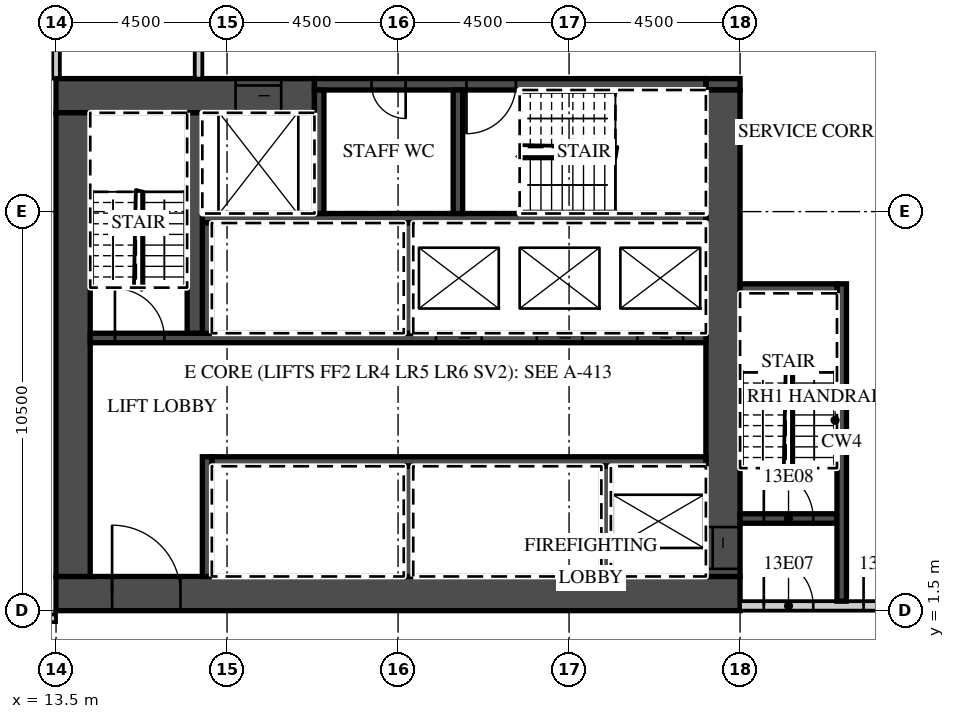
"""IFC4 building model, lengths in metres.
Left out: names, types, materials, properties, quantities, classifications, styles, units other than length and angle.
Written with IfcOpenShell. Run it as: python <this file> out.ifc"""

import sys

from ifc_helpers import new_model, si_unit, direction, frame, frame_2d, origin, place, context, subcontext, project, spatial, rectangle, extrude, element, fill, save


model = new_model("IFC4")
c1 = context("Model", 3, precision=1e-05, world=origin(), true_north=direction((0.0, 1.0)))
c2 = subcontext(c1, "Body", "Model", "MODEL_VIEW")
j1 = project(units=[si_unit("LENGTHUNIT", "METRE"), si_unit("PLANEANGLEUNIT", "RADIAN")], contexts=[c1])
p1 = place(None, origin())
s1 = spatial("IfcSite", under=j1, at=p1, CompositionType="ELEMENT")
p2 = place(p1, origin())
s2 = spatial("IfcBuilding", under=s1, at=p2, CompositionType="ELEMENT")
p3 = place(p2, frame((0.0, 0.0, 73.2)))
s3 = spatial("IfcBuildingStorey", under=s2, at=p3, CompositionType="ELEMENT", Elevation=73.2)
p4 = place(p3, frame((13.5, 15.5, 0.0), z_axis=(0.0, 0.0, 1.0), x_axis=(0.0, 1.0, 0.0)))
e1 = element("IfcWall", 1, at=p4, inside=s3, PredefinedType="PARTITIONING", context=c2, shape_type="SweptSolid", body=[
    extrude(rectangle(XDim=6.05, YDim=0.2, at=frame_2d((3.025, 0.0))), origin(), (0.0, 0.0, 1.0), 3.02),
])
p5 = place(p3, frame((-44.55, 1.3, 0.0), z_axis=(0.0, 0.0, 1.0), x_axis=(1.0, 0.0, 0.0)))
e2 = element("IfcWall", 2, at=p5, inside=s3, PredefinedType="PARTITIONING", context=c2, shape_type="SweptSolid", body=[
    extrude(rectangle(XDim=58.05, YDim=0.2, at=frame_2d((29.025, 0.0))), origin(), (0.0, 0.0, 1.0), 3.02),
])
p6 = place(p5, frame((0.525, 0.0, 0.0)))
e3 = element("IfcOpeningElement", 3, at=p6, cuts=e2, PredefinedType="OPENING", context=c2, shape_type="SweptSolid", body=[
    extrude(rectangle(XDim=1.0, YDim=2.1, at=frame_2d((0.5, 1.05))), frame((0.0, 0.11, 0.0), z_axis=(0.0, -1.0, 0.0), x_axis=(1.0, 0.0, 0.0)), (0.0, 0.0, 1.0), 0.22),
])
p7 = place(p5, frame((6.975, 0.0, 0.0)))
e4 = element("IfcOpeningElement", 4, at=p7, cuts=e2, PredefinedType="OPENING", context=c2, shape_type="SweptSolid", body=[
    extrude(rectangle(XDim=1.0, YDim=2.1, at=frame_2d((0.5, 1.05))), frame((0.0, 0.11, 0.0), z_axis=(0.0, -1.0, 0.0), x_axis=(1.0, 0.0, 0.0)), (0.0, 0.0, 1.0), 0.22),
])
p8 = place(p5, frame((9.125, 0.0, 0.0)))
e5 = element("IfcOpeningElement", 5, at=p8, cuts=e2, PredefinedType="OPENING", context=c2, shape_type="SweptSolid", body=[
    extrude(rectangle(XDim=1.0, YDim=2.1, at=frame_2d((0.5, 1.05))), frame((0.0, 0.11, 0.0), z_axis=(0.0, -1.0, 0.0), x_axis=(1.0, 0.0, 0.0)), (0.0, 0.0, 1.0), 0.22),
])
p9 = place(p5, frame((13.6, 0.0, 0.0)))
e6 = element("IfcOpeningElement", 6, at=p9, cuts=e2, PredefinedType="OPENING", context=c2, shape_type="SweptSolid", body=[
    extrude(rectangle(XDim=1.0, YDim=2.1, at=frame_2d((0.5, 1.05))), frame((0.0, 0.11, 0.0), z_axis=(0.0, -1.0, 0.0), x_axis=(1.0, 0.0, 0.0)), (0.0, 0.0, 1.0), 0.22),
])
p10 = place(p5, frame((19.987, 0.0, 0.0)))
e7 = element("IfcOpeningElement", 7, at=p10, cuts=e2, PredefinedType="OPENING", context=c2, shape_type="SweptSolid", body=[
    extrude(rectangle(XDim=1.2, YDim=2.1, at=frame_2d((0.6, 1.05))), frame((0.0, 0.11, 0.0), z_axis=(0.0, -1.0, 0.0), x_axis=(1.0, 0.0, 0.0)), (0.0, 0.0, 1.0), 0.22),
])
p11 = place(p5, frame((31.912, 0.0, 0.0)))
e8 = element("IfcOpeningElement", 8, at=p11, cuts=e2, PredefinedType="OPENING", context=c2, shape_type="SweptSolid", body=[
    extrude(rectangle(XDim=1.2, YDim=2.1, at=frame_2d((0.6, 1.05))), frame((0.0, 0.11, 0.0), z_axis=(0.0, -1.0, 0.0), x_axis=(1.0, 0.0, 0.0)), (0.0, 0.0, 1.0), 0.22),
])
p12 = place(p5, frame((38.5, 0.0, 0.0)))
e9 = element("IfcOpeningElement", 9, at=p12, cuts=e2, PredefinedType="OPENING", context=c2, shape_type="SweptSolid", body=[
    extrude(rectangle(XDim=1.0, YDim=2.1, at=frame_2d((0.5, 1.05))), frame((0.0, 0.11, 0.0), z_axis=(0.0, -1.0, 0.0), x_axis=(1.0, 0.0, 0.0)), (0.0, 0.0, 1.0), 0.22),
])
p13 = place(p5, frame((40.6, 0.0, 0.0)))
e10 = element("IfcOpeningElement", 10, at=p13, cuts=e2, PredefinedType="OPENING", context=c2, shape_type="SweptSolid", body=[
    extrude(rectangle(XDim=1.0, YDim=2.1, at=frame_2d((0.5, 1.05))), frame((0.0, 0.11, 0.0), z_axis=(0.0, -1.0, 0.0), x_axis=(1.0, 0.0, 0.0)), (0.0, 0.0, 1.0), 0.22),
])
p14 = place(p5, frame((47.5, 0.0, 0.0)))
e11 = element("IfcOpeningElement", 11, at=p14, cuts=e2, PredefinedType="OPENING", context=c2, shape_type="SweptSolid", body=[
    extrude(rectangle(XDim=1.0, YDim=2.1, at=frame_2d((0.5, 1.05))), frame((0.0, 0.11, 0.0), z_axis=(0.0, -1.0, 0.0), x_axis=(1.0, 0.0, 0.0)), (0.0, 0.0, 1.0), 0.22),
])
p15 = place(p5, frame((51.975, 0.0, 0.0)))
e12 = element("IfcOpeningElement", 12, at=p15, cuts=e2, PredefinedType="OPENING", context=c2, shape_type="SweptSolid", body=[
    extrude(rectangle(XDim=1.0, YDim=2.1, at=frame_2d((0.5, 1.05))), frame((0.0, 0.11, 0.0), z_axis=(0.0, -1.0, 0.0), x_axis=(1.0, 0.0, 0.0)), (0.0, 0.0, 1.0), 0.22),
])
p16 = place(p5, frame((56.475, 0.0, 0.0)))
e13 = element("IfcOpeningElement", 13, at=p16, cuts=e2, PredefinedType="OPENING", context=c2, shape_type="SweptSolid", body=[
    extrude(rectangle(XDim=1.0, YDim=2.1, at=frame_2d((0.5, 1.05))), frame((0.0, 0.11, 0.0), z_axis=(0.0, -1.0, 0.0), x_axis=(1.0, 0.0, 0.0)), (0.0, 0.0, 1.0), 0.22),
])
p17 = place(p3, frame((13.5, 1.95, 0.0), z_axis=(0.0, 0.0, 1.0), x_axis=(1.0, 0.0, 0.0)))
e14 = element("IfcWall", 14, at=p17, inside=s3, PredefinedType="SHEAR", context=c2, shape_type="SweptSolid", body=[
    extrude(rectangle(XDim=18.0, YDim=0.9, at=frame_2d((9.0, 0.0))), origin(), (0.0, 0.0, 1.0), 3.02),
])
p18 = place(p17, frame((1.475, 0.0, 0.0)))
e15 = element("IfcOpeningElement", 15, at=p18, cuts=e14, PredefinedType="OPENING", context=c2, shape_type="SweptSolid", body=[
    extrude(rectangle(XDim=1.8, YDim=2.1, at=frame_2d((0.9, 1.05))), frame((0.0, 0.46, 0.0), z_axis=(0.0, -1.0, 0.0), x_axis=(1.0, 0.0, 0.0)), (0.0, 0.0, 1.0), 0.92),
])
p19 = place(p3, frame((13.5, 15.05, 0.0), z_axis=(0.0, 0.0, 1.0), x_axis=(1.0, 0.0, 0.0)))
e16 = element("IfcWall", 16, at=p19, inside=s3, PredefinedType="SHEAR", context=c2, shape_type="SweptSolid", body=[
    extrude(rectangle(XDim=6.8, YDim=0.9, at=frame_2d((3.4, 0.0))), origin(), (0.0, 0.0, 1.0), 3.02),
])
p20 = place(p19, frame((4.725, 0.0, 0.0)))
e17 = element("IfcOpeningElement", 17, at=p20, cuts=e16, PredefinedType="OPENING", context=c2, shape_type="SweptSolid", body=[
    extrude(rectangle(XDim=1.2, YDim=2.1, at=frame_2d((0.6, 1.05))), frame((0.0, 0.46, 0.0), z_axis=(0.0, -1.0, 0.0), x_axis=(1.0, 0.0, 0.0)), (0.0, 0.0, 1.0), 0.92),
])
p21 = place(p3, frame((30.6, 15.35, 0.0), z_axis=(0.0, 0.0, 1.0), x_axis=(1.0, 0.0, 0.0)))
e18 = element("IfcWall", 18, at=p21, inside=s3, PredefinedType="SHEAR", context=c2, shape_type="SweptSolid", body=[
    extrude(rectangle(XDim=0.9, YDim=0.3, at=frame_2d((0.45, 0.0))), origin(), (0.0, 0.0, 1.0), 3.02),
])
p22 = place(p3, frame((20.3, 15.35, 0.0), z_axis=(0.0, 0.0, 1.0), x_axis=(1.0, 0.0, 0.0)))
e19 = element("IfcWall", 19, at=p22, inside=s3, PredefinedType="SHEAR", context=c2, shape_type="SweptSolid", body=[
    extrude(rectangle(XDim=10.3, YDim=0.3, at=frame_2d((5.15, 0.0))), origin(), (0.0, 0.0, 1.0), 3.02),
])
p23 = place(p22, frame((4.0, 0.0, 0.0)))
e20 = element("IfcOpeningElement", 20, at=p23, cuts=e19, PredefinedType="OPENING", context=c2, shape_type="SweptSolid", body=[
    extrude(rectangle(XDim=1.3, YDim=2.1, at=frame_2d((0.65, 1.05))), frame((0.0, 0.16, 0.0), z_axis=(0.0, -1.0, 0.0), x_axis=(1.0, 0.0, 0.0)), (0.0, 0.0, 1.0), 0.32),
])
p24 = place(p22, frame((1.5, 0.0, 0.0)))
e21 = element("IfcOpeningElement", 21, at=p24, cuts=e19, PredefinedType="OPENING", context=c2, shape_type="SweptSolid", body=[
    extrude(rectangle(XDim=0.9, YDim=2.1, at=frame_2d((0.45, 1.05))), frame((0.0, 0.16, 0.0), z_axis=(0.0, -1.0, 0.0), x_axis=(1.0, 0.0, 0.0)), (0.0, 0.0, 1.0), 0.32),
])
p25 = place(p3, frame((31.05, 2.4, 0.0), z_axis=(0.0, 0.0, 1.0), x_axis=(0.0, 1.0, 0.0)))
e22 = element("IfcWall", 22, at=p25, inside=s3, PredefinedType="SHEAR", context=c2, shape_type="SweptSolid", body=[
    extrude(rectangle(XDim=12.8, YDim=0.9, at=frame_2d((6.4, 0.0))), origin(), (0.0, 0.0, 1.0), 3.02),
])
p26 = place(p25, frame((0.2, 0.0, 0.0)))
e23 = element("IfcOpeningElement", 23, at=p26, cuts=e22, PredefinedType="OPENING", context=c2, shape_type="SweptSolid", body=[
    extrude(rectangle(XDim=1.1, YDim=2.1, at=frame_2d((0.55, 1.05))), frame((0.0, 0.46, 0.0), z_axis=(0.0, -1.0, 0.0), x_axis=(1.0, 0.0, 0.0)), (0.0, 0.0, 1.0), 0.92),
])
p27 = place(p3, frame((13.95, 2.4, 0.0), z_axis=(0.0, 0.0, 1.0), x_axis=(0.0, 1.0, 0.0)))
e24 = element("IfcWall", 24, at=p27, inside=s3, PredefinedType="SHEAR", context=c2, shape_type="SweptSolid", body=[
    extrude(rectangle(XDim=12.2, YDim=0.9, at=frame_2d((6.1, 0.0))), origin(), (0.0, 0.0, 1.0), 3.02),
])
p28 = place(p3, frame((17.6, 5.425, 0.0), z_axis=(0.0, 0.0, 1.0), x_axis=(1.0, 0.0, 0.0)))
e25 = element("IfcWall", 25, at=p28, inside=s3, PredefinedType="SHEAR", context=c2, shape_type="SweptSolid", body=[
    extrude(rectangle(XDim=13.0, YDim=0.25, at=frame_2d((6.5, 0.0))), origin(), (0.0, 0.0, 1.0), 3.02),
])
p29 = place(p3, frame((17.475, 2.4, 0.0), z_axis=(0.0, 0.0, 1.0), x_axis=(0.0, 1.0, 0.0)))
e26 = element("IfcWall", 26, at=p29, inside=s3, PredefinedType="SHEAR", context=c2, shape_type="SweptSolid", body=[
    extrude(rectangle(XDim=3.15, YDim=0.25, at=frame_2d((1.575, 0.0))), origin(), (0.0, 0.0, 1.0), 3.02),
])
for number, where, z_axis, x_axis in (
    (27, (27.975, 2.4, 0.0), (0.0, 0.0, 1.0), (0.0, 1.0, 0.0)),
    (28, (22.775, 2.4, 0.0), (0.0, 0.0, 1.0), (0.0, 1.0, 0.0)),
):
    element("IfcWall", number, at=place(p3, frame(where, z_axis=z_axis, x_axis=x_axis)), inside=s3, PredefinedType="SHEAR", context=c2, shape_type="SweptSolid", body=[
        extrude(rectangle(XDim=2.9, YDim=0.25, at=frame_2d((1.45, 0.0))), origin(), (0.0, 0.0, 1.0), 3.02),
    ])
p30 = place(p3, frame((14.4, 8.675, 0.0), z_axis=(0.0, 0.0, 1.0), x_axis=(1.0, 0.0, 0.0)))
e29 = element("IfcWall", 29, at=p30, inside=s3, PredefinedType="SHEAR", context=c2, shape_type="SweptSolid", body=[
    extrude(rectangle(XDim=16.2, YDim=0.25, at=frame_2d((8.1, 0.0))), origin(), (0.0, 0.0, 1.0), 3.02),
])
p31 = place(p30, frame((14.4, 0.0, 0.0)))
e30 = element("IfcOpeningElement", 30, at=p31, cuts=e29, PredefinedType="OPENING", context=c2, shape_type="SweptSolid", body=[
    extrude(rectangle(XDim=1.2, YDim=2.1, at=frame_2d((0.6, 1.05))), frame((0.0, 0.135, 0.0), z_axis=(0.0, -1.0, 0.0), x_axis=(1.0, 0.0, 0.0)), (0.0, 0.0, 1.0), 0.27),
])
p32 = place(p30, frame((11.75, 0.0, 0.0)))
e31 = element("IfcOpeningElement", 31, at=p32, cuts=e29, PredefinedType="OPENING", context=c2, shape_type="SweptSolid", body=[
    extrude(rectangle(XDim=1.2, YDim=2.1, at=frame_2d((0.6, 1.05))), frame((0.0, 0.135, 0.0), z_axis=(0.0, -1.0, 0.0), x_axis=(1.0, 0.0, 0.0)), (0.0, 0.0, 1.0), 0.27),
])
p33 = place(p30, frame((9.1, 0.0, 0.0)))
e32 = element("IfcOpeningElement", 32, at=p33, cuts=e29, PredefinedType="OPENING", context=c2, shape_type="SweptSolid", body=[
    extrude(rectangle(XDim=1.2, YDim=2.1, at=frame_2d((0.6, 1.05))), frame((0.0, 0.135, 0.0), z_axis=(0.0, -1.0, 0.0), x_axis=(1.0, 0.0, 0.0)), (0.0, 0.0, 1.0), 0.27),
])
p34 = place(p30, frame((0.65, 0.0, 0.0)))
e33 = element("IfcOpeningElement", 33, at=p34, cuts=e29, PredefinedType="OPENING", context=c2, shape_type="SweptSolid", body=[
    extrude(rectangle(XDim=1.3, YDim=2.1, at=frame_2d((0.65, 1.05))), frame((0.0, 0.135, 0.0), z_axis=(0.0, -1.0, 0.0), x_axis=(1.0, 0.0, 0.0)), (0.0, 0.0, 1.0), 0.27),
])
p35 = place(p3, frame((17.35, 11.825, 0.0), z_axis=(0.0, 0.0, 1.0), x_axis=(1.0, 0.0, 0.0)))
e34 = element("IfcWall", 34, at=p35, inside=s3, PredefinedType="SHEAR", context=c2, shape_type="SweptSolid", body=[
    extrude(rectangle(XDim=13.25, YDim=0.25, at=frame_2d((6.625, 0.0))), origin(), (0.0, 0.0, 1.0), 3.02),
])
for number, where, z_axis, x_axis in (
    (35, (17.475, 8.8, 0.0), (0.0, 0.0, 1.0), (0.0, 1.0, 0.0)),
    (36, (22.775, 8.8, 0.0), (0.0, 0.0, 1.0), (0.0, 1.0, 0.0)),
):
    element("IfcWall", number, at=place(p3, frame(where, z_axis=z_axis, x_axis=x_axis)), inside=s3, PredefinedType="SHEAR", context=c2, shape_type="SweptSolid", body=[
        extrude(rectangle(XDim=2.9, YDim=0.25, at=frame_2d((1.45, 0.0))), origin(), (0.0, 0.0, 1.0), 3.02),
    ])
p36 = place(p3, frame((17.15, 8.8, 0.0), z_axis=(0.0, 0.0, 1.0), x_axis=(0.0, 1.0, 0.0)))
e37 = element("IfcWall", 37, at=p36, inside=s3, PredefinedType="SHEAR", context=c2, shape_type="SweptSolid", body=[
    extrude(rectangle(XDim=5.8, YDim=0.4, at=frame_2d((2.9, 0.0))), origin(), (0.0, 0.0, 1.0), 3.02),
])
for number, where, z_axis, x_axis in (
    (38, (20.425, 11.95, 0.0), (0.0, 0.0, 1.0), (0.0, 1.0, 0.0)),
    (39, (24.075, 11.95, 0.0), (0.0, 0.0, 1.0), (0.0, 1.0, 0.0)),
):
    element("IfcWall", number, at=place(p3, frame(where, z_axis=z_axis, x_axis=x_axis)), inside=s3, PredefinedType="SHEAR", context=c2, shape_type="SweptSolid", body=[
        extrude(rectangle(XDim=3.25, YDim=0.25, at=frame_2d((1.625, 0.0))), origin(), (0.0, 0.0, 1.0), 3.02),
    ])
p37 = place(p3, frame((31.5, 1.625, 0.0), z_axis=(0.0, 0.0, 1.0), x_axis=(1.0, 0.0, 0.0)))
e40 = element("IfcWall", 40, at=p37, inside=s3, PredefinedType="PARTITIONING", context=c2, shape_type="SweptSolid", body=[
    extrude(rectangle(XDim=13.05, YDim=0.25, at=frame_2d((6.525, 0.0))), origin(), (0.0, 0.0, 1.0), 3.02),
])
p38 = place(p37, frame((0.625, 0.0, 0.0)))
e41 = element("IfcOpeningElement", 41, at=p38, cuts=e40, PredefinedType="OPENING", context=c2, shape_type="SweptSolid", body=[
    extrude(rectangle(XDim=1.3, YDim=2.1, at=frame_2d((0.65, 1.05))), frame((0.0, 0.135, 0.0), z_axis=(0.0, -1.0, 0.0), x_axis=(1.0, 0.0, 0.0)), (0.0, 0.0, 1.0), 0.27),
])
p39 = place(p37, frame((3.25, 0.0, 0.0)))
e42 = element("IfcOpeningElement", 42, at=p39, cuts=e40, PredefinedType="OPENING", context=c2, shape_type="SweptSolid", body=[
    extrude(rectangle(XDim=1.1, YDim=2.1, at=frame_2d((0.55, 1.05))), frame((0.0, 0.135, 0.0), z_axis=(0.0, -1.0, 0.0), x_axis=(1.0, 0.0, 0.0)), (0.0, 0.0, 1.0), 0.27),
])
p40 = place(p3, frame((31.5, 3.925, 0.0), z_axis=(0.0, 0.0, 1.0), x_axis=(1.0, 0.0, 0.0)))
e43 = element("IfcWall", 43, at=p40, inside=s3, PredefinedType="SHEAR", context=c2, shape_type="SweptSolid", body=[
    extrude(rectangle(XDim=2.55, YDim=0.25, at=frame_2d((1.275, 0.0))), origin(), (0.0, 0.0, 1.0), 3.02),
])
p41 = place(p40, frame((0.625, 0.0, 0.0)))
e44 = element("IfcOpeningElement", 44, at=p41, cuts=e43, PredefinedType="OPENING", context=c2, shape_type="SweptSolid", body=[
    extrude(rectangle(XDim=1.3, YDim=2.1, at=frame_2d((0.65, 1.05))), frame((0.0, 0.135, 0.0), z_axis=(0.0, -1.0, 0.0), x_axis=(1.0, 0.0, 0.0)), (0.0, 0.0, 1.0), 0.27),
])
p42 = place(p3, frame((34.175, 1.75, 0.0), z_axis=(0.0, 0.0, 1.0), x_axis=(0.0, 1.0, 0.0)))
e45 = element("IfcWall", 45, at=p42, inside=s3, PredefinedType="SHEAR", context=c2, shape_type="SweptSolid", body=[
    extrude(rectangle(XDim=8.35, YDim=0.25, at=frame_2d((4.175, 0.0))), origin(), (0.0, 0.0, 1.0), 3.02),
])
p43 = place(p3, frame((31.5, 9.975, 0.0), z_axis=(0.0, 0.0, 1.0), x_axis=(1.0, 0.0, 0.0)))
e46 = element("IfcWall", 46, at=p43, inside=s3, PredefinedType="SHEAR", context=c2, shape_type="SweptSolid", body=[
    extrude(rectangle(XDim=2.55, YDim=0.25, at=frame_2d((1.275, 0.0))), origin(), (0.0, 0.0, 1.0), 3.02),
])
p44 = place(p3, frame((17.25, 15.5, 0.0), z_axis=(0.0, 0.0, 1.0), x_axis=(0.0, 1.0, 0.0)))
e47 = element("IfcWall", 47, at=p44, inside=s3, PredefinedType="PARTITIONING", context=c2, shape_type="SweptSolid", body=[
    extrude(rectangle(XDim=2.2, YDim=0.2, at=frame_2d((1.1, 0.0))), origin(), (0.0, 0.0, 1.0), 3.02),
])
p45 = place(p31, origin())
e48 = element("IfcDoor", 48, at=p45, inside=s3, OperationType="SLIDING_TO_LEFT", PredefinedType="DOOR", context=c2, shape_type="SweptSolid", body=[
    extrude(rectangle(XDim=1.2, YDim=2.1, at=frame_2d((0.6, 1.05))), frame((0.0, 0.025, 0.0), z_axis=(0.0, -1.0, 0.0), x_axis=(1.0, 0.0, 0.0)), (0.0, 0.0, 1.0), 0.05),
])
fill(e30, e48)
p46 = place(p32, origin())
e49 = element("IfcDoor", 49, at=p46, inside=s3, OperationType="SLIDING_TO_RIGHT", PredefinedType="DOOR", context=c2, shape_type="SweptSolid", body=[
    extrude(rectangle(XDim=1.2, YDim=2.1, at=frame_2d((0.6, 1.05))), frame((0.0, 0.025, 0.0), z_axis=(0.0, -1.0, 0.0), x_axis=(1.0, 0.0, 0.0)), (0.0, 0.0, 1.0), 0.05),
])
fill(e31, e49)
p47 = place(p33, origin())
e50 = element("IfcDoor", 50, at=p47, inside=s3, OperationType="SLIDING_TO_RIGHT", PredefinedType="DOOR", context=c2, shape_type="SweptSolid", body=[
    extrude(rectangle(XDim=1.2, YDim=2.1, at=frame_2d((0.6, 1.05))), frame((0.0, 0.025, 0.0), z_axis=(0.0, -1.0, 0.0), x_axis=(1.0, 0.0, 0.0)), (0.0, 0.0, 1.0), 0.05),
])
fill(e32, e50)
p48 = place(p20, origin())
e51 = element("IfcDoor", 51, at=p48, inside=s3, OperationType="SLIDING_TO_LEFT", PredefinedType="DOOR", context=c2, shape_type="SweptSolid", body=[
    extrude(rectangle(XDim=1.2, YDim=2.1, at=frame_2d((0.6, 1.05))), frame((0.0, 0.025, 0.0), z_axis=(0.0, -1.0, 0.0), x_axis=(1.0, 0.0, 0.0)), (0.0, 0.0, 1.0), 0.05),
])
fill(e17, e51)
p49 = place(p26, origin())
e52 = element("IfcDoor", 52, at=p49, inside=s3, OperationType="SLIDING_TO_LEFT", PredefinedType="DOOR", context=c2, shape_type="SweptSolid", body=[
    extrude(rectangle(XDim=1.1, YDim=2.1, at=frame_2d((0.55, 1.05))), frame((0.0, 0.025, 0.0), z_axis=(0.0, -1.0, 0.0), x_axis=(1.0, 0.0, 0.0)), (0.0, 0.0, 1.0), 0.05),
])
fill(e23, e52)
p50 = place(p18, origin())
e53 = element("IfcDoor", 53, at=p50, inside=s3, OperationType="DOUBLE_DOOR_DOUBLE_SWING", PredefinedType="DOOR", context=c2, shape_type="SweptSolid", body=[
    extrude(rectangle(XDim=1.8, YDim=2.1, at=frame_2d((0.9, 1.05))), frame((0.0, 0.025, 0.0), z_axis=(0.0, -1.0, 0.0), x_axis=(1.0, 0.0, 0.0)), (0.0, 0.0, 1.0), 0.05),
])
fill(e15, e53)
p51 = place(p38, origin())
e54 = element("IfcDoor", 54, at=p51, inside=s3, OperationType="SINGLE_SWING_LEFT", PredefinedType="DOOR", context=c2, shape_type="SweptSolid", body=[
    extrude(rectangle(XDim=1.3, YDim=2.1, at=frame_2d((0.65, 1.05))), frame((0.0, 0.025, 0.0), z_axis=(0.0, -1.0, 0.0), x_axis=(1.0, 0.0, 0.0)), (0.0, 0.0, 1.0), 0.05),
])
fill(e41, e54)
p52 = place(p41, origin())
e55 = element("IfcDoor", 55, at=p52, inside=s3, OperationType="SINGLE_SWING_LEFT", PredefinedType="DOOR", context=c2, shape_type="SweptSolid", body=[
    extrude(rectangle(XDim=1.3, YDim=2.1, at=frame_2d((0.65, 1.05))), frame((0.0, 0.025, 0.0), z_axis=(0.0, -1.0, 0.0), x_axis=(1.0, 0.0, 0.0)), (0.0, 0.0, 1.0), 0.05),
])
fill(e44, e55)
p53 = place(p39, origin())
e56 = element("IfcDoor", 56, at=p53, inside=s3, OperationType="SINGLE_SWING_LEFT", PredefinedType="DOOR", context=c2, shape_type="SweptSolid", body=[
    extrude(rectangle(XDim=1.1, YDim=2.1, at=frame_2d((0.55, 1.05))), frame((0.0, 0.025, 0.0), z_axis=(0.0, -1.0, 0.0), x_axis=(1.0, 0.0, 0.0)), (0.0, 0.0, 1.0), 0.05),
])
fill(e42, e56)
p54 = place(p34, origin())
e57 = element("IfcDoor", 57, at=p54, inside=s3, OperationType="SINGLE_SWING_LEFT", PredefinedType="DOOR", context=c2, shape_type="SweptSolid", body=[
    extrude(rectangle(XDim=1.3, YDim=2.1, at=frame_2d((0.65, 1.05))), frame((0.0, 0.025, 0.0), z_axis=(0.0, -1.0, 0.0), x_axis=(1.0, 0.0, 0.0)), (0.0, 0.0, 1.0), 0.05),
])
fill(e33, e57)
p55 = place(p23, origin())
e58 = element("IfcDoor", 58, at=p55, inside=s3, OperationType="SINGLE_SWING_LEFT", PredefinedType="DOOR", context=c2, shape_type="SweptSolid", body=[
    extrude(rectangle(XDim=1.3, YDim=2.1, at=frame_2d((0.65, 1.05))), frame((0.0, 0.025, 0.0), z_axis=(0.0, -1.0, 0.0), x_axis=(1.0, 0.0, 0.0)), (0.0, 0.0, 1.0), 0.05),
])
fill(e20, e58)
p56 = place(p24, origin())
e59 = element("IfcDoor", 59, at=p56, inside=s3, OperationType="SINGLE_SWING_RIGHT", PredefinedType="DOOR", context=c2, shape_type="SweptSolid", body=[
    extrude(rectangle(XDim=0.9, YDim=2.1, at=frame_2d((0.45, 1.05))), frame((0.0, 0.025, 0.0), z_axis=(0.0, -1.0, 0.0), x_axis=(1.0, 0.0, 0.0)), (0.0, 0.0, 1.0), 0.05),
])
fill(e21, e59)
save(model, sys.argv[1])
